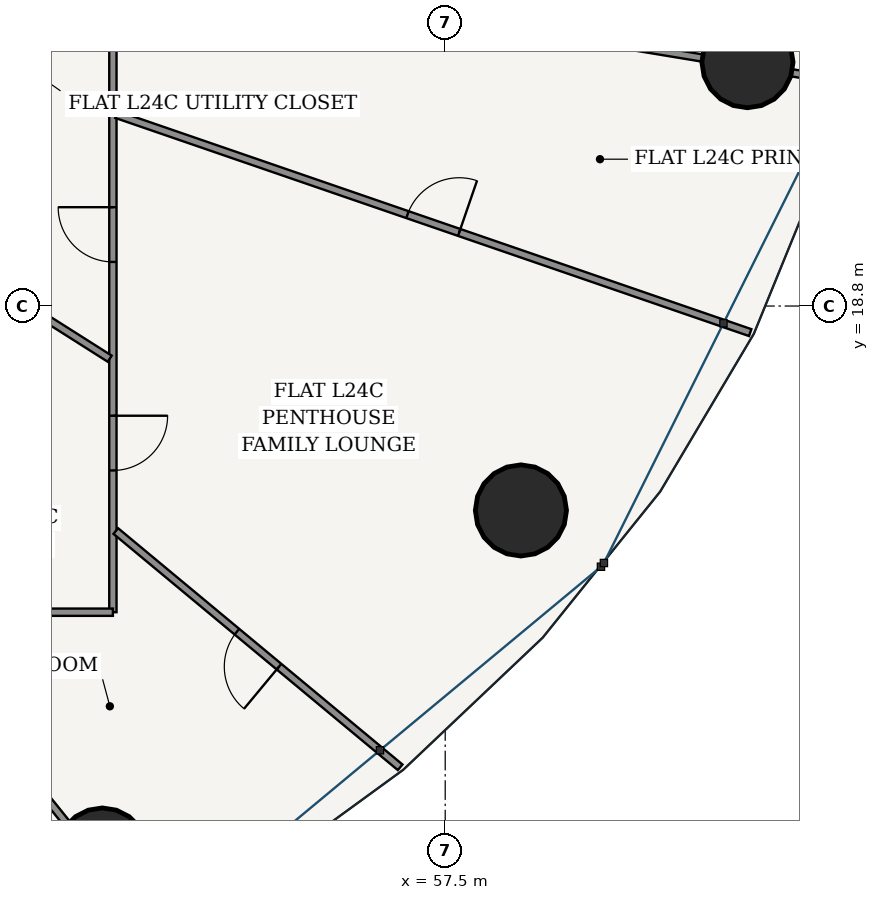
"""IFC4 building model, lengths in metres.
Left out: names, types, materials, properties, quantities, classifications, styles, units other than length and angle.
Written with IfcOpenShell. Run it as: python <this file> out.ifc"""

import sys

from ifc_helpers import new_model, si_unit, direction, frame, frame_2d, origin, origin_2d, place, context, subcontext, project, spatial, rectangle, hollow_circle, extrude, source, transform, mapped, element, fill, save


model = new_model("IFC4")
c1 = context("Model", 3, precision=1e-05, world=origin(), true_north=direction((-0.2419218956, 0.970295726276)))
c2 = subcontext(c1, "Body", "Model", "MODEL_VIEW")
j1 = project(units=[si_unit("LENGTHUNIT", "METRE"), si_unit("PLANEANGLEUNIT", "RADIAN")], contexts=[c1])
p1 = place(None, origin())
s1 = spatial("IfcSite", under=j1, at=p1, CompositionType="ELEMENT")
p2 = place(p1, origin())
s2 = spatial("IfcBuilding", under=s1, at=p2, CompositionType="ELEMENT")
p3 = place(p2, frame((0.0, 0.0, 94.2)))
s3 = spatial("IfcBuildingStorey", under=s2, at=p3, CompositionType="ELEMENT", Elevation=94.2)
for number, where, z_axis, x_axis in (
    (1, (51.862, 9.796, 0.0), (0.0, 0.0, 1.0), (1.0, 0.0, 0.0)),
    (2, (58.745, 15.438, 0.0), (0.0, 0.0, 1.0), (1.0, 0.0, 0.0)),
    (3, (62.471, 22.81, 0.0), (0.0, 0.0, 1.0), (1.0, 0.0, 0.0)),
):
    element("IfcColumn", number, at=place(p3, frame(where, z_axis=z_axis, x_axis=x_axis)), inside=s3, PredefinedType="COLUMN", context=c2, shape_type="SweptSolid", body=[
        extrude(hollow_circle(Radius=0.75, WallThickness=0.045, at=origin_2d()), origin(), (0.0, 0.0, 1.0), 3.6),
    ])
p4 = place(p3, frame((52.035, 34.49, 0.0), z_axis=(0.0, 0.0, 1.0), x_axis=(0.0, -1.0, 0.0)))
e4 = element("IfcWall", 4, at=p4, inside=s3, PredefinedType="PARTITIONING", context=c2, shape_type="SweptSolid", body=[
    extrude(rectangle(XDim=20.725, YDim=0.12, at=frame_2d((10.362, 0.0))), origin(), (0.0, 0.0, 1.0), 2.767),
])
p5 = place(p4, frame((17.493, 0.0, 0.0)))
e5 = element("IfcOpeningElement", 5, at=p5, cuts=e4, PredefinedType="OPENING", context=c2, shape_type="SweptSolid", body=[
    extrude(rectangle(XDim=0.9, YDim=2.15, at=frame_2d((0.45, 1.075))), frame((0.0, 0.07, 0.0), z_axis=(0.0, -1.0, 0.0), x_axis=(1.0, 0.0, 0.0)), (0.0, 0.0, 1.0), 0.14),
])
p6 = place(p4, frame((14.064, 0.0, 0.0)))
e6 = element("IfcOpeningElement", 6, at=p6, cuts=e4, PredefinedType="OPENING", context=c2, shape_type="SweptSolid", body=[
    extrude(rectangle(XDim=0.9, YDim=2.15, at=frame_2d((0.45, 1.075))), frame((0.0, 0.07, 0.0), z_axis=(0.0, -1.0, 0.0), x_axis=(1.0, 0.0, 0.0)), (0.0, 0.0, 1.0), 0.14),
])
p7 = place(p3, frame((52.035, 13.765, 0.0), z_axis=(0.0, 0.0, 1.0), x_axis=(-1.0, 0.0, 0.0)))
e7 = element("IfcWall", 7, at=p7, inside=s3, PredefinedType="PARTITIONING", context=c2, shape_type="SweptSolid", body=[
    extrude(rectangle(XDim=17.054, YDim=0.12, at=frame_2d((8.527, 0.0))), origin(), (0.0, 0.0, 1.0), 2.767),
])
p8 = place(p7, frame((7.203, 0.0, 0.0)))
e8 = element("IfcOpeningElement", 8, at=p8, cuts=e7, PredefinedType="OPENING", context=c2, shape_type="SweptSolid", body=[
    extrude(rectangle(XDim=0.9, YDim=2.15, at=frame_2d((0.45, 1.075))), frame((0.0, 0.07, 0.0), z_axis=(0.0, -1.0, 0.0), x_axis=(1.0, 0.0, 0.0)), (0.0, 0.0, 1.0), 0.14),
])
p9 = place(p3, frame((48.522, 13.717, 0.0), z_axis=(0.0, 0.0, 1.0), x_axis=(0.626707979732, -0.77925419995, 0.0)))
e9 = element("IfcWall", 9, at=p9, inside=s3, PredefinedType="PARTITIONING", context=c2, shape_type="SweptSolid", body=[
    extrude(rectangle(XDim=6.679, YDim=0.12, at=frame_2d((3.339, 0.0))), origin(), (0.0, 0.0, 1.0), 2.767),
])
p10 = place(p3, frame((52.083, 15.1, 0.0), z_axis=(0.0, 0.0, 1.0), x_axis=(0.769161827891, -0.63905405289, 0.0)))
e10 = element("IfcWall", 10, at=p10, inside=s3, PredefinedType="PARTITIONING", context=c2, shape_type="SweptSolid", body=[
    extrude(rectangle(XDim=6.08, YDim=0.12, at=frame_2d((3.04, 0.0))), origin(), (0.0, 0.0, 1.0), 2.767),
])
p11 = place(p10, frame((2.59, 0.0, 0.0)))
e11 = element("IfcOpeningElement", 11, at=p11, cuts=e10, PredefinedType="OPENING", context=c2, shape_type="SweptSolid", body=[
    extrude(rectangle(XDim=0.9, YDim=2.15, at=frame_2d((0.45, 1.075))), frame((0.0, 0.07, 0.0), z_axis=(0.0, -1.0, 0.0), x_axis=(1.0, 0.0, 0.0)), (0.0, 0.0, 1.0), 0.14),
])
p12 = place(p3, frame((52.094, 21.95, 0.0), z_axis=(0.0, 0.0, 1.0), x_axis=(0.945573120726, -0.32540970078, 0.0)))
e12 = element("IfcWall", 12, at=p12, inside=s3, PredefinedType="PARTITIONING", context=c2, shape_type="SweptSolid", body=[
    extrude(rectangle(XDim=11.022, YDim=0.12, at=frame_2d((5.511, 0.0))), origin(), (0.0, 0.0, 1.0), 2.767),
])
p13 = place(p12, frame((5.061, 0.0, 0.0)))
e13 = element("IfcOpeningElement", 13, at=p13, cuts=e12, PredefinedType="OPENING", context=c2, shape_type="SweptSolid", body=[
    extrude(rectangle(XDim=0.9, YDim=2.15, at=frame_2d((0.45, 1.075))), frame((0.0, 0.07, 0.0), z_axis=(0.0, -1.0, 0.0), x_axis=(1.0, 0.0, 0.0)), (0.0, 0.0, 1.0), 0.14),
])
p14 = place(p3, frame((52.096, 24.47, 0.0), z_axis=(0.0, 0.0, 1.0), x_axis=(0.986618264768, -0.163047231274, 0.0)))
e14 = element("IfcWall", 14, at=p14, inside=s3, PredefinedType="PARTITIONING", context=c2, shape_type="SweptSolid", body=[
    extrude(rectangle(XDim=12.039, YDim=0.12, at=frame_2d((6.02, 0.0))), origin(), (0.0, 0.0, 1.0), 2.767),
])
p15 = place(p14, frame((4.496, 0.0, 0.0)))
e15 = element("IfcOpeningElement", 15, at=p15, cuts=e14, PredefinedType="OPENING", context=c2, shape_type="SweptSolid", body=[
    extrude(rectangle(XDim=0.9, YDim=2.15, at=frame_2d((0.45, 1.075))), frame((0.0, 0.07, 0.0), z_axis=(0.0, -1.0, 0.0), x_axis=(1.0, 0.0, 0.0)), (0.0, 0.0, 1.0), 0.14),
])
p16 = place(p3, frame((49.387, 19.58, 0.0), z_axis=(0.0, 0.0, 1.0), x_axis=(0.844540118368, -0.535492286094, 0.0)))
e16 = element("IfcWall", 16, at=p16, inside=s3, PredefinedType="PARTITIONING", context=c2, shape_type="SweptSolid", body=[
    extrude(rectangle(XDim=3.074, YDim=0.12, at=frame_2d((1.537, 0.0))), origin(), (0.0, 0.0, 1.0), 3.325),
])
m1 = source(origin(), c2, "Body", "SweptSolid", [
    extrude(rectangle(XDim=0.9, YDim=2.15, at=frame_2d((0.45, 1.075))), frame((0.0, 0.025, 0.0), z_axis=(0.0, -1.0, 0.0), x_axis=(1.0, 0.0, 0.0)), (0.0, 0.0, 1.0), 0.05),
])
p17 = place(p5, origin())
e17 = element("IfcDoor", 17, at=p17, inside=s3, OperationType="SINGLE_SWING_LEFT", PredefinedType="DOOR", context=c2, shape_type="MappedRepresentation", body=[
    mapped(m1, transform((0.0, 0.0, 0.0), scale=1.0)),
])
fill(e5, e17)
p18 = place(p6, frame((0.9, 0.0, 0.0), z_axis=(0.0, 0.0, 1.0), x_axis=(-1.0, 0.0, 0.0)))
e18 = element("IfcDoor", 18, at=p18, inside=s3, OperationType="SINGLE_SWING_RIGHT", PredefinedType="DOOR", context=c2, shape_type="MappedRepresentation", body=[
    mapped(m1, transform((0.0, 0.0, 0.0), scale=1.0)),
])
fill(e6, e18)
p19 = place(p11, frame((0.9, 0.0, 0.0), z_axis=(0.0, 0.0, 1.0), x_axis=(-1.0, 0.0, 0.0)))
e19 = element("IfcDoor", 19, at=p19, inside=s3, OperationType="SINGLE_SWING_LEFT", PredefinedType="DOOR", context=c2, shape_type="MappedRepresentation", body=[
    mapped(m1, transform((0.0, 0.0, 0.0), scale=1.0)),
])
fill(e11, e19)
p20 = place(p13, origin())
e20 = element("IfcDoor", 20, at=p20, inside=s3, OperationType="SINGLE_SWING_RIGHT", PredefinedType="DOOR", context=c2, shape_type="MappedRepresentation", body=[
    mapped(m1, transform((0.0, 0.0, 0.0), scale=1.0)),
])
fill(e13, e20)
save(model, sys.argv[1])
